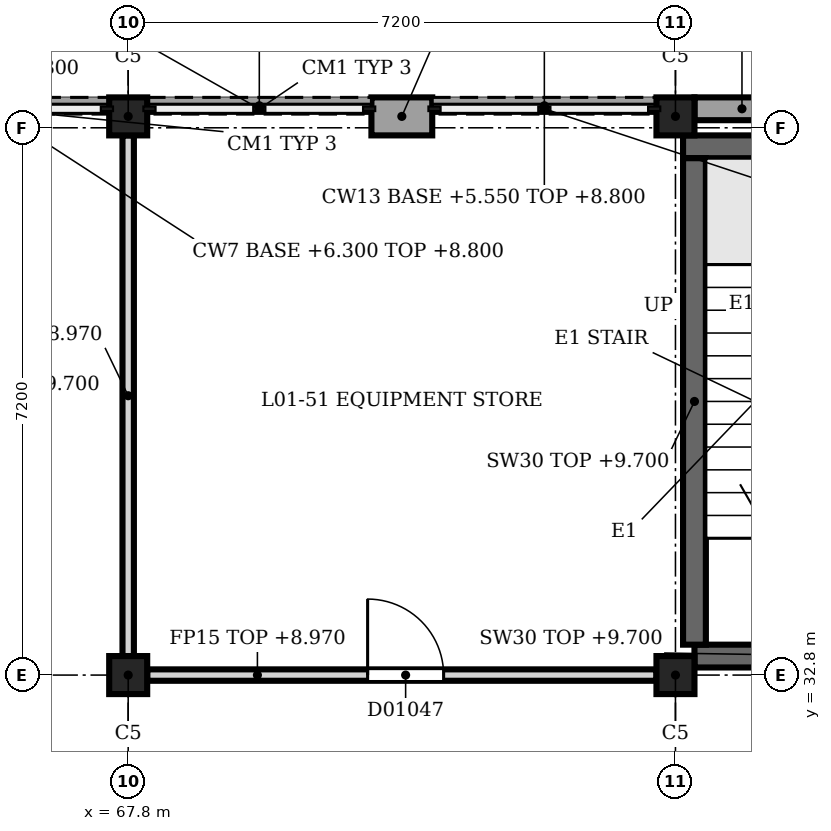
"""IFC4 building model, lengths in metres.
Left out: names, types, materials, properties, quantities, classifications, styles, units other than length and angle.
Written with IfcOpenShell. Run it as: python <this file> out.ifc"""

import sys

from ifc_helpers import new_model, si_unit, direction, frame, frame_2d, origin, origin_2d, place, context, subcontext, project, spatial, rectangle, extrude, element, fill, save


model = new_model("IFC4")
c1 = context("Model", 3, precision=1e-05, world=origin(), true_north=direction((0.0, 1.0)))
c2 = subcontext(c1, "Body", "Model", "MODEL_VIEW")
j1 = project(units=[si_unit("LENGTHUNIT", "METRE"), si_unit("PLANEANGLEUNIT", "RADIAN")], contexts=[c1])
p1 = place(None, origin())
s1 = spatial("IfcSite", under=j1, at=p1, CompositionType="ELEMENT")
p2 = place(p1, origin())
s2 = spatial("IfcBuilding", under=s1, at=p2, CompositionType="ELEMENT")
p3 = place(p2, frame((0.0, 0.0, 5.4)))
s3 = spatial("IfcBuildingStorey", under=s2, at=p3, CompositionType="ELEMENT", Elevation=5.4)
for number, where, z_axis, x_axis in (
    (1, (67.8, 32.8, 0.0), (0.0, 0.0, 1.0), (1.0, 0.0, 0.0)),
    (2, (67.8, 40.15, 0.0), (0.0, 0.0, 1.0), (1.0, 0.0, 0.0)),
    (3, (75.0, 32.8, 0.0), (0.0, 0.0, 1.0), (1.0, 0.0, 0.0)),
    (4, (75.0, 40.15, 0.0), (0.0, 0.0, 1.0), (1.0, 0.0, 0.0)),
):
    element("IfcColumn", number, at=place(p3, frame(where, z_axis=z_axis, x_axis=x_axis)), inside=s3, PredefinedType="COLUMN", context=c2, shape_type="SweptSolid", body=[
        extrude(rectangle(XDim=0.5, YDim=0.5, at=origin_2d()), origin(), (0.0, 0.0, 1.0), 4.5),
    ])
p4 = place(p3, frame((71.0, 40.15, 0.0), z_axis=(0.0, 0.0, 1.0), x_axis=(1.0, 0.0, 0.0)))
e5 = element("IfcWall", 5, at=p4, inside=s3, PredefinedType="SOLIDWALL", context=c2, shape_type="SweptSolid", body=[
    extrude(rectangle(XDim=0.8, YDim=0.5, at=frame_2d((0.4, 0.0))), origin(), (0.0, 0.0, 1.0), 3.4),
])
p5 = place(p3, frame((64.5, 40.29, 0.0), z_axis=(0.0, 0.0, 1.0), x_axis=(1.0, 0.0, 0.0)))
e6 = element("IfcWall", 6, at=p5, inside=s3, PredefinedType="SOLIDWALL", context=c2, shape_type="SweptSolid", body=[
    extrude(rectangle(XDim=3.05, YDim=0.22, at=frame_2d((1.525, 0.0))), origin(), (0.0, 0.0, 1.0), 0.9),
])
p6 = place(p3, frame((68.05, 40.29, 0.0), z_axis=(0.0, 0.0, 1.0), x_axis=(1.0, 0.0, 0.0)))
e7 = element("IfcWall", 7, at=p6, inside=s3, PredefinedType="SOLIDWALL", context=c2, shape_type="SweptSolid", body=[
    extrude(rectangle(XDim=2.95, YDim=0.22, at=frame_2d((1.475, 0.0))), origin(), (0.0, 0.0, 1.0), 0.9),
])
p7 = place(p3, frame((71.8, 40.29, 0.0), z_axis=(0.0, 0.0, 1.0), x_axis=(1.0, 0.0, 0.0)))
e8 = element("IfcWall", 8, at=p7, inside=s3, PredefinedType="SOLIDWALL", context=c2, shape_type="SweptSolid", body=[
    extrude(rectangle(XDim=2.95, YDim=0.22, at=frame_2d((1.475, 0.0))), origin(), (0.0, 0.0, 1.0), 0.15),
])
p8 = place(p3, frame((75.25, 40.25, 0.0), z_axis=(0.0, 0.0, 1.0), x_axis=(1.0, 0.0, 0.0)))
e9 = element("IfcWall", 9, at=p8, inside=s3, PredefinedType="SOLIDWALL", context=c2, shape_type="SweptSolid", body=[
    extrude(rectangle(XDim=2.95, YDim=0.3, at=frame_2d((1.475, 0.0))), origin(), (0.0, 0.0, 1.0), 3.4),
])
p9 = place(p8, frame((1.25, 0.0, 1.2)))
e10 = element("IfcOpeningElement", 10, at=p9, cuts=e9, PredefinedType="OPENING", context=c2, shape_type="SweptSolid", body=[
    extrude(rectangle(XDim=0.6, YDim=1.8, at=frame_2d((0.3, 0.9))), frame((0.0, 0.16, 0.0), z_axis=(0.0, -1.0, 0.0), x_axis=(1.0, 0.0, 0.0)), (0.0, 0.0, 1.0), 0.32),
])
p10 = place(p3, frame((75.25, 33.05, 0.0), z_axis=(0.0, 0.0, 1.0), x_axis=(1.0, 0.0, 0.0)))
e11 = element("IfcWall", 11, at=p10, inside=s3, PredefinedType="SHEAR", context=c2, shape_type="SweptSolid", body=[
    extrude(rectangle(XDim=6.55, YDim=0.3, at=frame_2d((3.275, 0.0))), origin(), (0.0, 0.0, 1.0), 4.3),
])
p11 = place(p10, frame((4.35, 0.0, 0.0)))
e12 = element("IfcOpeningElement", 12, at=p11, cuts=e11, PredefinedType="OPENING", context=c2, shape_type="SweptSolid", body=[
    extrude(rectangle(XDim=1.2, YDim=2.1, at=frame_2d((0.6, 1.05))), frame((0.0, 0.16, 0.0), z_axis=(0.0, -1.0, 0.0), x_axis=(1.0, 0.0, 0.0)), (0.0, 0.0, 1.0), 0.32),
])
p12 = place(p3, frame((75.1, 39.75, 0.0), z_axis=(0.0, 0.0, 1.0), x_axis=(1.0, 0.0, 0.0)))
e13 = element("IfcWall", 13, at=p12, inside=s3, PredefinedType="SHEAR", context=c2, shape_type="SweptSolid", body=[
    extrude(rectangle(XDim=7.0, YDim=0.3, at=frame_2d((3.5, 0.0))), origin(), (0.0, 0.0, 1.0), 4.3),
])
p13 = place(p12, frame((1.4, 0.0, 1.2)))
e14 = element("IfcOpeningElement", 14, at=p13, cuts=e13, PredefinedType="OPENING", context=c2, shape_type="SweptSolid", body=[
    extrude(rectangle(XDim=0.6, YDim=1.8, at=frame_2d((0.3, 0.9))), frame((0.0, 0.16, 0.0), z_axis=(0.0, -1.0, 0.0), x_axis=(1.0, 0.0, 0.0)), (0.0, 0.0, 1.0), 0.32),
])
p14 = place(p3, frame((75.25, 33.2, 0.0), z_axis=(0.0, 0.0, 1.0), x_axis=(0.0, 1.0, 0.0)))
e15 = element("IfcWall", 15, at=p14, inside=s3, PredefinedType="SHEAR", context=c2, shape_type="SweptSolid", body=[
    extrude(rectangle(XDim=6.4, YDim=0.3, at=frame_2d((3.2, 0.0))), origin(), (0.0, 0.0, 1.0), 4.3),
])
p15 = place(p3, frame((68.05, 32.8, 0.0), z_axis=(0.0, 0.0, 1.0), x_axis=(1.0, 0.0, 0.0)))
e16 = element("IfcWall", 16, at=p15, inside=s3, PredefinedType="PARTITIONING", context=c2, shape_type="SweptSolid", body=[
    extrude(rectangle(XDim=6.7, YDim=0.15, at=frame_2d((3.35, 0.0))), origin(), (0.0, 0.0, 1.0), 3.57),
])
p16 = place(p15, frame((2.9, 0.0, 0.0)))
e17 = element("IfcOpeningElement", 17, at=p16, cuts=e16, PredefinedType="OPENING", context=c2, shape_type="SweptSolid", body=[
    extrude(rectangle(XDim=1.0, YDim=2.1, at=frame_2d((0.5, 1.05))), frame((0.0, 0.085, 0.0), z_axis=(0.0, -1.0, 0.0), x_axis=(1.0, 0.0, 0.0)), (0.0, 0.0, 1.0), 0.17),
])
p17 = place(p3, frame((67.8, 33.05, 0.0), z_axis=(0.0, 0.0, 1.0), x_axis=(0.0, 1.0, 0.0)))
e18 = element("IfcWall", 18, at=p17, inside=s3, PredefinedType="PARTITIONING", context=c2, shape_type="SweptSolid", body=[
    extrude(rectangle(XDim=6.85, YDim=0.15, at=frame_2d((3.425, 0.0))), origin(), (0.0, 0.0, 1.0), 3.57),
])
p18 = place(p16, origin())
e19 = element("IfcDoor", 19, at=p18, inside=s3, OperationType="SINGLE_SWING_RIGHT", PredefinedType="DOOR", context=c2, shape_type="SweptSolid", body=[
    extrude(rectangle(XDim=1.0, YDim=2.1, at=frame_2d((0.5, 1.05))), frame((0.0, 0.025, 0.0), z_axis=(0.0, -1.0, 0.0), x_axis=(1.0, 0.0, 0.0)), (0.0, 0.0, 1.0), 0.05),
])
fill(e17, e19)
save(model, sys.argv[1])
